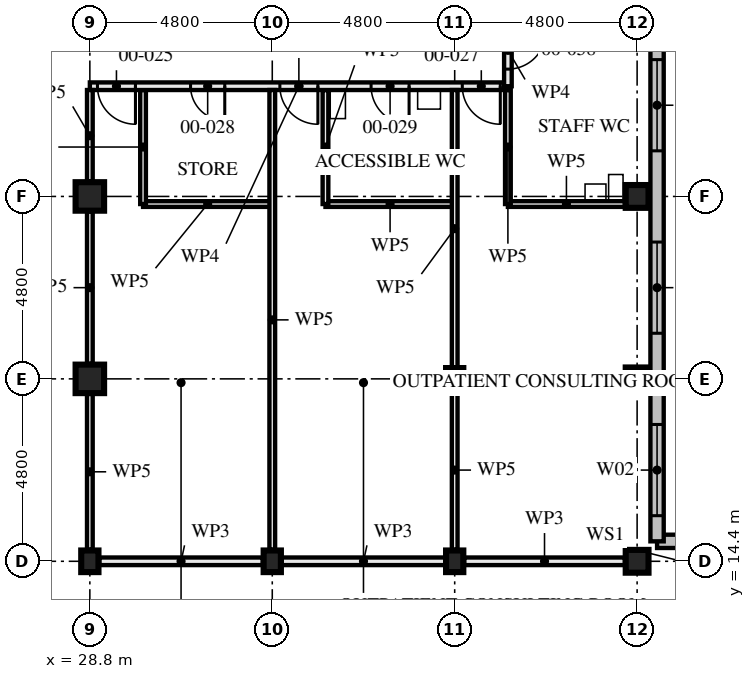
"""IFC4 building model, lengths in metres.
Left out: names, types, materials, properties, quantities, classifications, styles, units other than length and angle.
Written with IfcOpenShell. Run it as: python <this file> out.ifc"""

import sys

from ifc_helpers import new_model, si_unit, direction, frame, frame_2d, origin, origin_2d, place, context, subcontext, project, spatial, rectangle, hollow_rectangle, i_section, extrude, element, fill, save


model = new_model("IFC4")
c1 = context("Model", 3, precision=1e-05, world=origin(), true_north=direction((0.0, 1.0)))
c2 = subcontext(c1, "Body", "Model", "MODEL_VIEW")
j1 = project(units=[si_unit("LENGTHUNIT", "METRE"), si_unit("PLANEANGLEUNIT", "RADIAN")], contexts=[c1])
p1 = place(None, origin())
s1 = spatial("IfcSite", under=j1, at=p1, CompositionType="ELEMENT")
p2 = place(p1, origin())
s2 = spatial("IfcBuilding", under=s1, at=p2, CompositionType="ELEMENT")
p3 = place(p2, origin())
s3 = spatial("IfcBuildingStorey", under=s2, at=p3, CompositionType="ELEMENT", Elevation=0.0)
p4 = place(p3, frame((28.8, 14.4, 0.0), z_axis=(0.0, 0.0, 1.0), x_axis=(1.0, 0.0, 0.0)))
e1 = element("IfcColumn", 1, at=p4, inside=s3, PredefinedType="COLUMN", context=c2, shape_type="SweptSolid", body=[
    extrude(i_section(OverallWidth=0.454, OverallDepth=0.569, WebThickness=0.078, FlangeThickness=0.125, FilletRadius=0.015, at=origin_2d()), origin(), (0.0, 0.0, 1.0), 4.5),
])
for number, where, z_axis, x_axis in (
    (2, (28.8, 19.2, 0.0), (0.0, 0.0, 1.0), (1.0, 0.0, 0.0)),
    (3, (28.8, 24.0, 0.0), (0.0, 0.0, 1.0), (1.0, 0.0, 0.0)),
):
    element("IfcColumn", number, at=place(p3, frame(where, z_axis=z_axis, x_axis=x_axis)), inside=s3, PredefinedType="COLUMN", context=c2, shape_type="SweptSolid", body=[
        extrude(hollow_rectangle(XDim=0.75, YDim=0.75, WallThickness=0.08, at=origin_2d()), origin(), (0.0, 0.0, 1.0), 4.5),
    ])
for number, where, z_axis, x_axis in (
    (4, (33.6, 14.4, 0.0), (0.0, 0.0, 1.0), (1.0, 0.0, 0.0)),
    (5, (38.4, 14.4, 0.0), (0.0, 0.0, 1.0), (1.0, 0.0, 0.0)),
    (6, (38.4, 19.2, 0.0), (0.0, 0.0, 1.0), (1.0, 0.0, 0.0)),
):
    element("IfcColumn", number, at=place(p3, frame(where, z_axis=z_axis, x_axis=x_axis)), inside=s3, PredefinedType="COLUMN", context=c2, shape_type="SweptSolid", body=[
        extrude(i_section(OverallWidth=0.454, OverallDepth=0.569, WebThickness=0.078, FlangeThickness=0.125, FilletRadius=0.015, at=origin_2d()), origin(), (0.0, 0.0, 1.0), 4.5),
    ])
p5 = place(p3, frame((43.2, 14.4, 0.0), z_axis=(0.0, 0.0, 1.0), x_axis=(0.0, 1.0, 0.0)))
e7 = element("IfcColumn", 7, at=p5, inside=s3, PredefinedType="COLUMN", context=c2, shape_type="SweptSolid", body=[
    extrude(hollow_rectangle(XDim=0.6, YDim=0.6, WallThickness=0.05, at=origin_2d()), origin(), (0.0, 0.0, 1.0), 4.5),
])
for number, where, z_axis, x_axis in (
    (8, (43.2, 19.2, 0.0), (0.0, 0.0, 1.0), (1.0, 0.0, 0.0)),
    (9, (43.2, 24.0, 0.0), (0.0, 0.0, 1.0), (1.0, 0.0, 0.0)),
):
    element("IfcColumn", number, at=place(p3, frame(where, z_axis=z_axis, x_axis=x_axis)), inside=s3, PredefinedType="COLUMN", context=c2, shape_type="SweptSolid", body=[
        extrude(hollow_rectangle(XDim=0.6, YDim=0.6, WallThickness=0.08, at=origin_2d()), origin(), (0.0, 0.0, 1.0), 4.5),
    ])
p6 = place(p3, frame((48.525, 14.925, 0.0), z_axis=(0.0, 0.0, 1.0), x_axis=(-1.0, 0.0, 0.0)))
e10 = element("IfcWall", 10, at=p6, inside=s3, PredefinedType="SOLIDWALL", context=c2, shape_type="SweptSolid", body=[
    extrude(rectangle(XDim=4.8, YDim=0.35, at=frame_2d((2.4, 0.0))), origin(), (0.0, 0.0, 1.0), 4.5),
])
p7 = place(p6, frame((1.725, 0.0, 0.9)))
e11 = element("IfcOpeningElement", 11, at=p7, cuts=e10, PredefinedType="OPENING", context=c2, shape_type="SweptSolid", body=[
    extrude(rectangle(XDim=2.4, YDim=2.4, at=frame_2d((1.2, 1.2))), frame((0.0, 0.186, 0.0), z_axis=(0.0, -1.0, 0.0), x_axis=(1.0, 0.0, 0.0)), (0.0, 0.0, 1.0), 0.371),
])
p8 = place(p3, frame((43.725, 14.925, 0.0), z_axis=(0.0, 0.0, 1.0), x_axis=(0.0, 1.0, 0.0)))
e12 = element("IfcWall", 12, at=p8, inside=s3, PredefinedType="SOLIDWALL", context=c2, shape_type="SweptSolid", body=[
    extrude(rectangle(XDim=38.4, YDim=0.35, at=frame_2d((19.2, 0.0))), origin(), (0.0, 0.0, 1.0), 4.5),
])
p9 = place(p8, frame((15.675, 0.0, 0.0)))
e13 = element("IfcOpeningElement", 13, at=p9, cuts=e12, PredefinedType="OPENING", context=c2, shape_type="SweptSolid", body=[
    extrude(rectangle(XDim=1.2, YDim=2.4, at=frame_2d((0.6, 1.2))), frame((0.0, 0.186, 0.0), z_axis=(0.0, -1.0, 0.0), x_axis=(1.0, 0.0, 0.0)), (0.0, 0.0, 1.0), 0.371),
])
p10 = place(p8, frame((0.675, 0.0, 0.9)))
e14 = element("IfcOpeningElement", 14, at=p10, cuts=e12, PredefinedType="OPENING", context=c2, shape_type="SweptSolid", body=[
    extrude(rectangle(XDim=2.4, YDim=2.4, at=frame_2d((1.2, 1.2))), frame((0.0, 0.186, 0.0), z_axis=(0.0, -1.0, 0.0), x_axis=(1.0, 0.0, 0.0)), (0.0, 0.0, 1.0), 0.371),
])
p11 = place(p8, frame((5.475, 0.0, 0.9)))
e15 = element("IfcOpeningElement", 15, at=p11, cuts=e12, PredefinedType="OPENING", context=c2, shape_type="SweptSolid", body=[
    extrude(rectangle(XDim=2.4, YDim=2.4, at=frame_2d((1.2, 1.2))), frame((0.0, 0.186, 0.0), z_axis=(0.0, -1.0, 0.0), x_axis=(1.0, 0.0, 0.0)), (0.0, 0.0, 1.0), 0.371),
])
p12 = place(p8, frame((10.275, 0.0, 0.9)))
e16 = element("IfcOpeningElement", 16, at=p12, cuts=e12, PredefinedType="OPENING", context=c2, shape_type="SweptSolid", body=[
    extrude(rectangle(XDim=2.4, YDim=2.4, at=frame_2d((1.2, 1.2))), frame((0.0, 0.186, 0.0), z_axis=(0.0, -1.0, 0.0), x_axis=(1.0, 0.0, 0.0)), (0.0, 0.0, 1.0), 0.371),
])
p13 = place(p8, frame((19.875, 0.0, 0.9)))
e17 = element("IfcOpeningElement", 17, at=p13, cuts=e12, PredefinedType="OPENING", context=c2, shape_type="SweptSolid", body=[
    extrude(rectangle(XDim=2.4, YDim=2.4, at=frame_2d((1.2, 1.2))), frame((0.0, 0.186, 0.0), z_axis=(0.0, -1.0, 0.0), x_axis=(1.0, 0.0, 0.0)), (0.0, 0.0, 1.0), 0.371),
])
p14 = place(p8, frame((24.675, 0.0, 0.9)))
e18 = element("IfcOpeningElement", 18, at=p14, cuts=e12, PredefinedType="OPENING", context=c2, shape_type="SweptSolid", body=[
    extrude(rectangle(XDim=2.4, YDim=2.4, at=frame_2d((1.2, 1.2))), frame((0.0, 0.186, 0.0), z_axis=(0.0, -1.0, 0.0), x_axis=(1.0, 0.0, 0.0)), (0.0, 0.0, 1.0), 0.371),
])
p15 = place(p8, frame((29.475, 0.0, 0.9)))
e19 = element("IfcOpeningElement", 19, at=p15, cuts=e12, PredefinedType="OPENING", context=c2, shape_type="SweptSolid", body=[
    extrude(rectangle(XDim=2.4, YDim=2.4, at=frame_2d((1.2, 1.2))), frame((0.0, 0.186, 0.0), z_axis=(0.0, -1.0, 0.0), x_axis=(1.0, 0.0, 0.0)), (0.0, 0.0, 1.0), 0.371),
])
p16 = place(p8, frame((34.275, 0.0, 0.9)))
e20 = element("IfcOpeningElement", 20, at=p16, cuts=e12, PredefinedType="OPENING", context=c2, shape_type="SweptSolid", body=[
    extrude(rectangle(XDim=2.4, YDim=2.4, at=frame_2d((1.2, 1.2))), frame((0.0, 0.186, 0.0), z_axis=(0.0, -1.0, 0.0), x_axis=(1.0, 0.0, 0.0)), (0.0, 0.0, 1.0), 0.371),
])
p17 = place(p3, frame((30.2, 23.8, 0.0), z_axis=(0.0, 0.0, 1.0), x_axis=(0.0, 1.0, 0.0)))
e21 = element("IfcWall", 21, at=p17, inside=s3, PredefinedType="PARTITIONING", context=c2, shape_type="SweptSolid", body=[
    extrude(rectangle(XDim=3.0, YDim=0.15, at=frame_2d((1.5, 0.0))), origin(), (0.0, 0.0, 1.0), 3.55),
])
p18 = place(p3, frame((30.2, 23.8, 0.0), z_axis=(0.0, 0.0, 1.0), x_axis=(1.0, 0.0, 0.0)))
e22 = element("IfcWall", 22, at=p18, inside=s3, PredefinedType="PARTITIONING", context=c2, shape_type="SweptSolid", body=[
    extrude(rectangle(XDim=3.4, YDim=0.15, at=frame_2d((1.7, 0.0))), origin(), (0.0, 0.0, 1.0), 4.33),
])
p19 = place(p3, frame((35.0, 23.8, 0.0), z_axis=(0.0, 0.0, 1.0), x_axis=(0.0, 1.0, 0.0)))
e23 = element("IfcWall", 23, at=p19, inside=s3, PredefinedType="PARTITIONING", context=c2, shape_type="SweptSolid", body=[
    extrude(rectangle(XDim=3.0, YDim=0.15, at=frame_2d((1.5, 0.0))), origin(), (0.0, 0.0, 1.0), 3.55),
])
p20 = place(p3, frame((35.0, 23.8, 0.0), z_axis=(0.0, 0.0, 1.0), x_axis=(1.0, 0.0, 0.0)))
e24 = element("IfcWall", 24, at=p20, inside=s3, PredefinedType="PARTITIONING", context=c2, shape_type="SweptSolid", body=[
    extrude(rectangle(XDim=3.4, YDim=0.15, at=frame_2d((1.7, 0.0))), origin(), (0.0, 0.0, 1.0), 4.33),
])
p21 = place(p3, frame((39.8, 23.8, 0.0), z_axis=(0.0, 0.0, 1.0), x_axis=(0.0, 1.0, 0.0)))
e25 = element("IfcWall", 25, at=p21, inside=s3, PredefinedType="PARTITIONING", context=c2, shape_type="SweptSolid", body=[
    extrude(rectangle(XDim=3.0, YDim=0.15, at=frame_2d((1.5, 0.0))), origin(), (0.0, 0.0, 1.0), 3.55),
])
p22 = place(p3, frame((39.8, 23.8, 0.0), z_axis=(0.0, 0.0, 1.0), x_axis=(1.0, 0.0, 0.0)))
e26 = element("IfcWall", 26, at=p22, inside=s3, PredefinedType="PARTITIONING", context=c2, shape_type="SweptSolid", body=[
    extrude(rectangle(XDim=3.08, YDim=0.15, at=frame_2d((1.54, 0.0))), origin(), (0.0, 0.0, 1.0), 4.33),
])
p23 = place(p3, frame((33.6, 14.705, 0.0), z_axis=(0.0, 0.0, 1.0), x_axis=(0.0, 1.0, 0.0)))
e27 = element("IfcWall", 27, at=p23, inside=s3, PredefinedType="PARTITIONING", context=c2, shape_type="SweptSolid", body=[
    extrude(rectangle(XDim=12.095, YDim=0.15, at=frame_2d((6.048, 0.0))), origin(), (0.0, 0.0, 1.0), 3.55),
])
p24 = place(p3, frame((38.4, 14.705, 0.0), z_axis=(0.0, 0.0, 1.0), x_axis=(0.0, 1.0, 0.0)))
e28 = element("IfcWall", 28, at=p24, inside=s3, PredefinedType="PARTITIONING", context=c2, shape_type="SweptSolid", body=[
    extrude(rectangle(XDim=4.191, YDim=0.15, at=frame_2d((2.095, 0.0))), origin(), (0.0, 0.0, 1.0), 3.55),
])
p25 = place(p3, frame((38.4, 19.504, 0.0), z_axis=(0.0, 0.0, 1.0), x_axis=(0.0, 1.0, 0.0)))
e29 = element("IfcWall", 29, at=p25, inside=s3, PredefinedType="PARTITIONING", context=c2, shape_type="SweptSolid", body=[
    extrude(rectangle(XDim=7.296, YDim=0.15, at=frame_2d((3.648, 0.0))), origin(), (0.0, 0.0, 1.0), 3.55),
])
p26 = place(p3, frame((28.8, 26.9, 0.0), z_axis=(0.0, 0.0, 1.0), x_axis=(1.0, 0.0, 0.0)))
e30 = element("IfcWall", 30, at=p26, inside=s3, PredefinedType="PARTITIONING", context=c2, shape_type="SweptSolid", body=[
    extrude(rectangle(XDim=11.0, YDim=0.2, at=frame_2d((5.5, 0.0))), origin(), (0.0, 0.0, 1.0), 4.33),
])
p27 = place(p26, frame((0.2, 0.0, 0.0)))
e31 = element("IfcOpeningElement", 31, at=p27, cuts=e30, PredefinedType="OPENING", context=c2, shape_type="SweptSolid", body=[
    extrude(rectangle(XDim=1.0, YDim=2.4, at=frame_2d((0.5, 1.2))), frame((0.0, 0.111, 0.0), z_axis=(0.0, -1.0, 0.0), x_axis=(1.0, 0.0, 0.0)), (0.0, 0.0, 1.0), 0.221),
])
p28 = place(p26, frame((5.0, 0.0, 0.0)))
e32 = element("IfcOpeningElement", 32, at=p28, cuts=e30, PredefinedType="OPENING", context=c2, shape_type="SweptSolid", body=[
    extrude(rectangle(XDim=1.0, YDim=2.4, at=frame_2d((0.5, 1.2))), frame((0.0, 0.111, 0.0), z_axis=(0.0, -1.0, 0.0), x_axis=(1.0, 0.0, 0.0)), (0.0, 0.0, 1.0), 0.221),
])
p29 = place(p26, frame((9.8, 0.0, 0.0)))
e33 = element("IfcOpeningElement", 33, at=p29, cuts=e30, PredefinedType="OPENING", context=c2, shape_type="SweptSolid", body=[
    extrude(rectangle(XDim=1.0, YDim=2.4, at=frame_2d((0.5, 1.2))), frame((0.0, 0.111, 0.0), z_axis=(0.0, -1.0, 0.0), x_axis=(1.0, 0.0, 0.0)), (0.0, 0.0, 1.0), 0.221),
])
p30 = place(p26, frame((2.65, 0.0, 0.0)))
e34 = element("IfcOpeningElement", 34, at=p30, cuts=e30, PredefinedType="OPENING", context=c2, shape_type="SweptSolid", body=[
    extrude(rectangle(XDim=0.9, YDim=2.1, at=frame_2d((0.45, 1.05))), frame((0.0, 0.111, 0.0), z_axis=(0.0, -1.0, 0.0), x_axis=(1.0, 0.0, 0.0)), (0.0, 0.0, 1.0), 0.221),
])
p31 = place(p26, frame((7.4, 0.0, 0.0)))
e35 = element("IfcOpeningElement", 35, at=p31, cuts=e30, PredefinedType="OPENING", context=c2, shape_type="SweptSolid", body=[
    extrude(rectangle(XDim=1.0, YDim=2.1, at=frame_2d((0.5, 1.05))), frame((0.0, 0.111, 0.0), z_axis=(0.0, -1.0, 0.0), x_axis=(1.0, 0.0, 0.0)), (0.0, 0.0, 1.0), 0.221),
])
p32 = place(p3, frame((29.047, 14.4, 0.0), z_axis=(0.0, 0.0, 1.0), x_axis=(1.0, 0.0, 0.0)))
e36 = element("IfcWall", 36, at=p32, inside=s3, PredefinedType="PARTITIONING", context=c2, shape_type="SweptSolid", body=[
    extrude(rectangle(XDim=4.306, YDim=0.2, at=frame_2d((2.153, 0.0))), origin(), (0.0, 0.0, 1.0), 3.32),
])
p33 = place(p3, frame((33.847, 14.4, 0.0), z_axis=(0.0, 0.0, 1.0), x_axis=(1.0, 0.0, 0.0)))
e37 = element("IfcWall", 37, at=p33, inside=s3, PredefinedType="PARTITIONING", context=c2, shape_type="SweptSolid", body=[
    extrude(rectangle(XDim=4.306, YDim=0.2, at=frame_2d((2.153, 0.0))), origin(), (0.0, 0.0, 1.0), 3.32),
])
p34 = place(p3, frame((38.647, 14.4, 0.0), z_axis=(0.0, 0.0, 1.0), x_axis=(1.0, 0.0, 0.0)))
e38 = element("IfcWall", 38, at=p34, inside=s3, PredefinedType="PARTITIONING", context=c2, shape_type="SweptSolid", body=[
    extrude(rectangle(XDim=4.233, YDim=0.2, at=frame_2d((2.116, 0.0))), origin(), (0.0, 0.0, 1.0), 3.32),
])
p35 = place(p3, frame((28.8, 14.705, 0.0), z_axis=(0.0, 0.0, 1.0), x_axis=(0.0, 1.0, 0.0)))
e39 = element("IfcWall", 39, at=p35, inside=s3, PredefinedType="PARTITIONING", context=c2, shape_type="SweptSolid", body=[
    extrude(rectangle(XDim=4.1, YDim=0.15, at=frame_2d((2.05, 0.0))), origin(), (0.0, 0.0, 1.0), 3.32),
])
p36 = place(p3, frame((28.8, 19.595, 0.0), z_axis=(0.0, 0.0, 1.0), x_axis=(0.0, 1.0, 0.0)))
e40 = element("IfcWall", 40, at=p36, inside=s3, PredefinedType="PARTITIONING", context=c2, shape_type="SweptSolid", body=[
    extrude(rectangle(XDim=4.01, YDim=0.15, at=frame_2d((2.005, 0.0))), origin(), (0.0, 0.0, 1.0), 3.32),
])
p37 = place(p3, frame((28.8, 24.395, 0.0), z_axis=(0.0, 0.0, 1.0), x_axis=(0.0, 1.0, 0.0)))
e41 = element("IfcWall", 41, at=p37, inside=s3, PredefinedType="PARTITIONING", context=c2, shape_type="SweptSolid", body=[
    extrude(rectangle(XDim=2.405, YDim=0.15, at=frame_2d((1.203, 0.0))), origin(), (0.0, 0.0, 1.0), 3.32),
])
p38 = place(p3, frame((39.8, 26.9, 0.0), z_axis=(0.0, 0.0, 1.0), x_axis=(0.0, 1.0, 0.0)))
e42 = element("IfcWall", 42, at=p38, inside=s3, PredefinedType="PARTITIONING", context=c2, shape_type="SweptSolid", body=[
    extrude(rectangle(XDim=1.9, YDim=0.2, at=frame_2d((0.95, 0.0))), origin(), (0.0, 0.0, 1.0), 4.33),
])
p39 = place(p38, frame((0.45, 0.0, 0.0)))
e43 = element("IfcOpeningElement", 43, at=p39, cuts=e42, PredefinedType="OPENING", context=c2, shape_type="SweptSolid", body=[
    extrude(rectangle(XDim=1.0, YDim=2.1, at=frame_2d((0.5, 1.05))), frame((0.0, 0.111, 0.0), z_axis=(0.0, -1.0, 0.0), x_axis=(1.0, 0.0, 0.0)), (0.0, 0.0, 1.0), 0.221),
])
p40 = place(p10, origin())
e44 = element("IfcWindow", 44, at=p40, inside=s3, PartitioningType="SINGLE_PANEL", PredefinedType="WINDOW", context=c2, shape_type="SweptSolid", body=[
    extrude(rectangle(XDim=2.4, YDim=2.4, at=frame_2d((1.2, 1.2))), frame((0.0, 0.03, 0.0), z_axis=(0.0, -1.0, 0.0), x_axis=(1.0, 0.0, 0.0)), (0.0, 0.0, 1.0), 0.06),
])
fill(e14, e44)
p41 = place(p11, origin())
e45 = element("IfcWindow", 45, at=p41, inside=s3, PartitioningType="SINGLE_PANEL", PredefinedType="WINDOW", context=c2, shape_type="SweptSolid", body=[
    extrude(rectangle(XDim=2.4, YDim=2.4, at=frame_2d((1.2, 1.2))), frame((0.0, 0.03, 0.0), z_axis=(0.0, -1.0, 0.0), x_axis=(1.0, 0.0, 0.0)), (0.0, 0.0, 1.0), 0.06),
])
fill(e15, e45)
p42 = place(p12, origin())
e46 = element("IfcWindow", 46, at=p42, inside=s3, PartitioningType="SINGLE_PANEL", PredefinedType="WINDOW", context=c2, shape_type="SweptSolid", body=[
    extrude(rectangle(XDim=2.4, YDim=2.4, at=frame_2d((1.2, 1.2))), frame((0.0, 0.03, 0.0), z_axis=(0.0, -1.0, 0.0), x_axis=(1.0, 0.0, 0.0)), (0.0, 0.0, 1.0), 0.06),
])
fill(e16, e46)
p43 = place(p27, frame((1.0, 0.0, 0.0), z_axis=(0.0, 0.0, 1.0), x_axis=(-1.0, 0.0, 0.0)))
e47 = element("IfcDoor", 47, at=p43, inside=s3, OperationType="SINGLE_SWING_RIGHT", PredefinedType="DOOR", context=c2, shape_type="SweptSolid", body=[
    extrude(rectangle(XDim=1.0, YDim=2.4, at=frame_2d((0.5, 1.2))), frame((0.0, 0.027, 0.0), z_axis=(0.0, -1.0, 0.0), x_axis=(1.0, 0.0, 0.0)), (0.0, 0.0, 1.0), 0.054),
])
fill(e31, e47)
p44 = place(p28, frame((1.0, 0.0, 0.0), z_axis=(0.0, 0.0, 1.0), x_axis=(-1.0, 0.0, 0.0)))
e48 = element("IfcDoor", 48, at=p44, inside=s3, OperationType="SINGLE_SWING_RIGHT", PredefinedType="DOOR", context=c2, shape_type="SweptSolid", body=[
    extrude(rectangle(XDim=1.0, YDim=2.4, at=frame_2d((0.5, 1.2))), frame((0.0, 0.027, 0.0), z_axis=(0.0, -1.0, 0.0), x_axis=(1.0, 0.0, 0.0)), (0.0, 0.0, 1.0), 0.054),
])
fill(e32, e48)
p45 = place(p29, frame((1.0, 0.0, 0.0), z_axis=(0.0, 0.0, 1.0), x_axis=(-1.0, 0.0, 0.0)))
e49 = element("IfcDoor", 49, at=p45, inside=s3, OperationType="SINGLE_SWING_RIGHT", PredefinedType="DOOR", context=c2, shape_type="SweptSolid", body=[
    extrude(rectangle(XDim=1.0, YDim=2.4, at=frame_2d((0.5, 1.2))), frame((0.0, 0.027, 0.0), z_axis=(0.0, -1.0, 0.0), x_axis=(1.0, 0.0, 0.0)), (0.0, 0.0, 1.0), 0.054),
])
fill(e33, e49)
p46 = place(p30, frame((0.9, 0.0, 0.0), z_axis=(0.0, 0.0, 1.0), x_axis=(-1.0, 0.0, 0.0)))
e50 = element("IfcDoor", 50, at=p46, inside=s3, OperationType="SINGLE_SWING_RIGHT", PredefinedType="DOOR", context=c2, shape_type="SweptSolid", body=[
    extrude(rectangle(XDim=0.9, YDim=2.1, at=frame_2d((0.45, 1.05))), frame((0.0, 0.027, 0.0), z_axis=(0.0, -1.0, 0.0), x_axis=(1.0, 0.0, 0.0)), (0.0, 0.0, 1.0), 0.054),
])
fill(e34, e50)
p47 = place(p31, frame((1.0, 0.0, 0.0), z_axis=(0.0, 0.0, 1.0), x_axis=(-1.0, 0.0, 0.0)))
e51 = element("IfcDoor", 51, at=p47, inside=s3, OperationType="SINGLE_SWING_RIGHT", PredefinedType="DOOR", context=c2, shape_type="SweptSolid", body=[
    extrude(rectangle(XDim=1.0, YDim=2.1, at=frame_2d((0.5, 1.05))), frame((0.0, 0.027, 0.0), z_axis=(0.0, -1.0, 0.0), x_axis=(1.0, 0.0, 0.0)), (0.0, 0.0, 1.0), 0.054),
])
fill(e35, e51)
p48 = place(p39, frame((1.0, 0.0, 0.0), z_axis=(0.0, 0.0, 1.0), x_axis=(-1.0, 0.0, 0.0)))
e52 = element("IfcDoor", 52, at=p48, inside=s3, OperationType="SINGLE_SWING_RIGHT", PredefinedType="DOOR", context=c2, shape_type="SweptSolid", body=[
    extrude(rectangle(XDim=1.0, YDim=2.1, at=frame_2d((0.5, 1.05))), frame((0.0, 0.027, 0.0), z_axis=(0.0, -1.0, 0.0), x_axis=(1.0, 0.0, 0.0)), (0.0, 0.0, 1.0), 0.054),
])
fill(e43, e52)
save(model, sys.argv[1])
